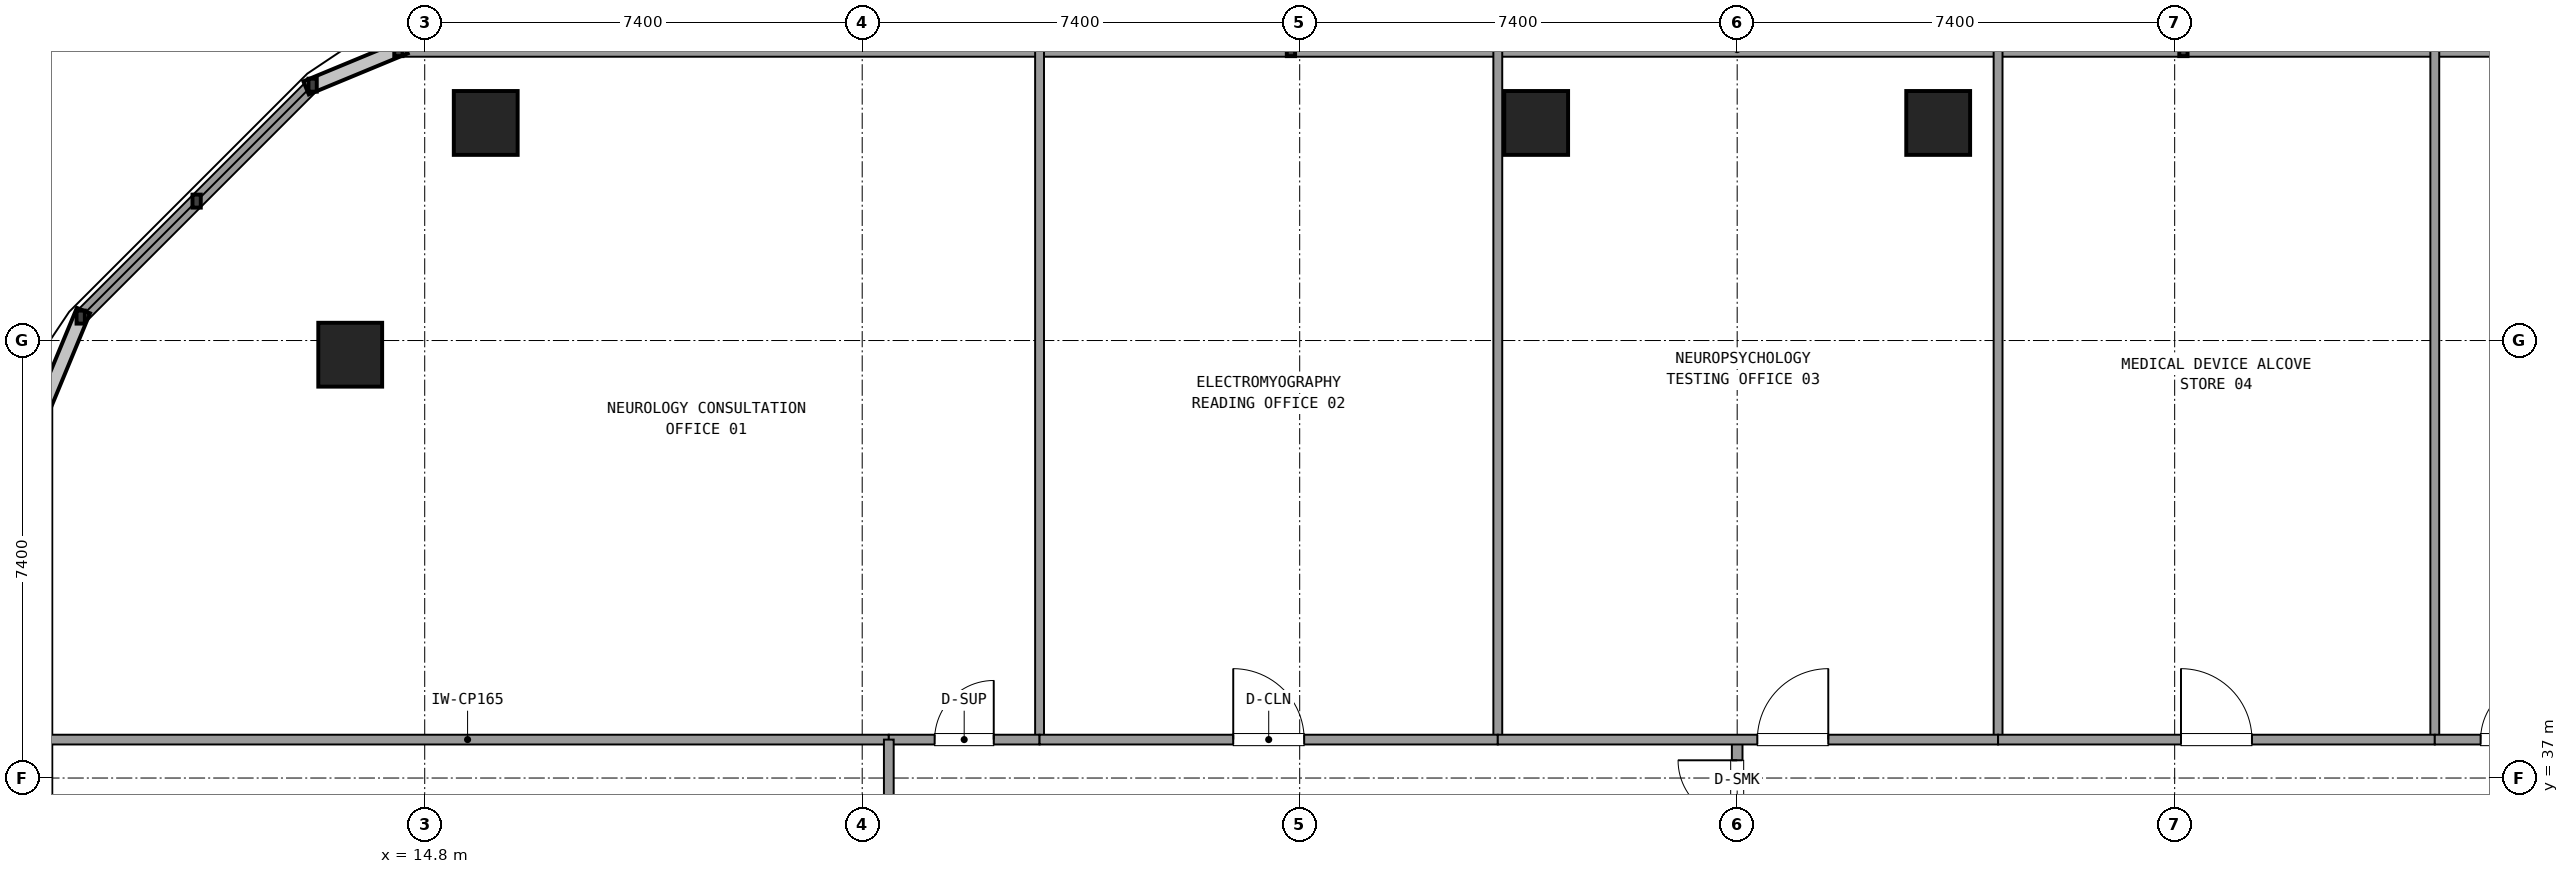
"""IFC4 building model, lengths in metres.
Left out: names, types, materials, properties, quantities, classifications, styles, units other than length and angle.
Written with IfcOpenShell. Run it as: python <this file> out.ifc"""

import sys

from ifc_helpers import new_model, si_unit, direction, frame, frame_2d, origin, origin_2d, place, context, subcontext, project, spatial, rectangle, extrude, element, fill, save


model = new_model("IFC4")
c1 = context("Model", 3, precision=1e-05, world=origin(), true_north=direction((0.0, 1.0)))
c2 = subcontext(c1, "Body", "Model", "MODEL_VIEW")
j1 = project(units=[si_unit("LENGTHUNIT", "METRE"), si_unit("PLANEANGLEUNIT", "RADIAN")], contexts=[c1])
p1 = place(None, origin())
s1 = spatial("IfcSite", under=j1, at=p1, CompositionType="ELEMENT")
p2 = place(p1, origin())
s2 = spatial("IfcBuilding", under=s1, at=p2, CompositionType="ELEMENT")
p3 = place(p2, frame((0.0, 0.0, 63.54)))
s3 = spatial("IfcBuildingStorey", under=s2, at=p3, CompositionType="ELEMENT", Elevation=63.54)
for number, where, z_axis, x_axis in (
    (1, (40.4, 48.08, 0.0), (0.0, 0.0, 1.0), (1.0, 0.0, 0.0)),
    (2, (33.6, 48.08, 0.0), (0.0, 0.0, 1.0), (1.0, 0.0, 0.0)),
    (3, (15.832, 48.08, 0.0), (0.0, 0.0, 1.0), (1.0, 0.0, 0.0)),
    (4, (13.54, 44.16, 0.0), (0.0, 0.0, 1.0), (1.0, 0.0, 0.0)),
):
    element("IfcColumn", number, at=place(p3, frame(where, z_axis=z_axis, x_axis=x_axis)), inside=s3, PredefinedType="COLUMN", context=c2, shape_type="SweptSolid", body=[
        extrude(rectangle(XDim=1.08, YDim=1.08, at=origin_2d()), origin(), (0.0, 0.0, 1.0), 3.6),
    ])
p4 = place(p3, frame((59.645, 49.32, 0.0), z_axis=(0.0, 0.0, 1.0), x_axis=(-1.0, 0.0, 0.0)))
e5 = element("IfcWall", 5, at=p4, inside=s3, PredefinedType="SOLIDWALL", context=c2, shape_type="SweptSolid", body=[
    extrude(rectangle(XDim=45.29, YDim=0.24, at=frame_2d((22.645, 0.0))), origin(), (0.0, 0.0, 1.0), 0.85),
])
p5 = place(p3, frame((12.904, 48.719, 0.0), z_axis=(0.0, 0.0, 1.0), x_axis=(-0.707106781187, -0.707106781187, 0.0)))
e6 = element("IfcWall", 6, at=p5, inside=s3, PredefinedType="SOLIDWALL", context=c2, shape_type="SweptSolid", body=[
    extrude(rectangle(XDim=5.548, YDim=0.24, at=frame_2d((2.774, 0.0))), origin(), (0.0, 0.0, 1.0), 0.85),
])
p6 = place(p3, frame((37.0, 34.95, 0.0), z_axis=(0.0, 0.0, 1.0), x_axis=(0.0, 1.0, 0.0)))
e7 = element("IfcWall", 7, at=p6, inside=s3, PredefinedType="PARTITIONING", context=c2, shape_type="SweptSolid", body=[
    extrude(rectangle(XDim=2.7, YDim=0.18, at=frame_2d((1.35, 0.0))), origin(), (0.0, 0.0, 1.0), 2.61),
])
p7 = place(p6, frame((0.35, 0.0, 0.0)))
e8 = element("IfcOpeningElement", 8, at=p7, cuts=e7, PredefinedType="OPENING", context=c2, shape_type="SweptSolid", body=[
    extrude(rectangle(XDim=2.0, YDim=2.2, at=frame_2d((1.0, 1.1))), frame((0.0, 0.1, 0.0), z_axis=(0.0, -1.0, 0.0), x_axis=(1.0, 0.0, 0.0)), (0.0, 0.0, 1.0), 0.2),
])
p8 = place(p3, frame((8.4, 37.65, 0.0), z_axis=(0.0, 0.0, 1.0), x_axis=(1.0, 0.0, 0.0)))
e9 = element("IfcWall", 9, at=p8, inside=s3, PredefinedType="PARTITIONING", context=c2, shape_type="SweptSolid", body=[
    extrude(rectangle(XDim=14.25, YDim=0.165, at=frame_2d((7.125, 0.0))), origin(), (0.0, 0.0, 1.0), 2.61),
])
p9 = place(p3, frame((25.2, 37.65, 0.0), z_axis=(0.0, 0.0, 1.0), x_axis=(0.0, 1.0, 0.0)))
e10 = element("IfcWall", 10, at=p9, inside=s3, PredefinedType="PARTITIONING", context=c2, shape_type="SweptSolid", body=[
    extrude(rectangle(XDim=11.65, YDim=0.15, at=frame_2d((5.825, 0.0))), origin(), (0.0, 0.0, 1.0), 2.61),
])
p10 = place(p3, frame((22.65, 37.65, 0.0), z_axis=(0.0, 0.0, 1.0), x_axis=(1.0, 0.0, 0.0)))
e11 = element("IfcWall", 11, at=p10, inside=s3, PredefinedType="PARTITIONING", context=c2, shape_type="SweptSolid", body=[
    extrude(rectangle(XDim=2.55, YDim=0.165, at=frame_2d((1.275, 0.0))), origin(), (0.0, 0.0, 1.0), 2.61),
])
p11 = place(p10, frame((0.775, 0.0, 0.0)))
e12 = element("IfcOpeningElement", 12, at=p11, cuts=e11, PredefinedType="OPENING", context=c2, shape_type="SweptSolid", body=[
    extrude(rectangle(XDim=1.0, YDim=2.15, at=frame_2d((0.5, 1.075))), frame((0.0, 0.093, 0.0), z_axis=(0.0, -1.0, 0.0), x_axis=(1.0, 0.0, 0.0)), (0.0, 0.0, 1.0), 0.185),
])
p12 = place(p3, frame((32.951, 37.65, 0.0), z_axis=(0.0, 0.0, 1.0), x_axis=(0.0, 1.0, 0.0)))
e13 = element("IfcWall", 13, at=p12, inside=s3, PredefinedType="PARTITIONING", context=c2, shape_type="SweptSolid", body=[
    extrude(rectangle(XDim=11.65, YDim=0.15, at=frame_2d((5.825, 0.0))), origin(), (0.0, 0.0, 1.0), 2.61),
])
p13 = place(p3, frame((25.2, 37.65, 0.0), z_axis=(0.0, 0.0, 1.0), x_axis=(1.0, 0.0, 0.0)))
e14 = element("IfcWall", 14, at=p13, inside=s3, PredefinedType="PARTITIONING", context=c2, shape_type="SweptSolid", body=[
    extrude(rectangle(XDim=7.751, YDim=0.165, at=frame_2d((3.875, 0.0))), origin(), (0.0, 0.0, 1.0), 2.61),
])
p14 = place(p13, frame((3.276, 0.0, 0.0)))
e15 = element("IfcOpeningElement", 15, at=p14, cuts=e14, PredefinedType="OPENING", context=c2, shape_type="SweptSolid", body=[
    extrude(rectangle(XDim=1.2, YDim=2.15, at=frame_2d((0.6, 1.075))), frame((0.0, 0.093, 0.0), z_axis=(0.0, -1.0, 0.0), x_axis=(1.0, 0.0, 0.0)), (0.0, 0.0, 1.0), 0.185),
])
p15 = place(p3, frame((41.413, 37.65, 0.0), z_axis=(0.0, 0.0, 1.0), x_axis=(0.0, 1.0, 0.0)))
e16 = element("IfcWall", 16, at=p15, inside=s3, PredefinedType="PARTITIONING", context=c2, shape_type="SweptSolid", body=[
    extrude(rectangle(XDim=11.65, YDim=0.15, at=frame_2d((5.825, 0.0))), origin(), (0.0, 0.0, 1.0), 2.61),
])
p16 = place(p3, frame((32.951, 37.65, 0.0), z_axis=(0.0, 0.0, 1.0), x_axis=(1.0, 0.0, 0.0)))
e17 = element("IfcWall", 17, at=p16, inside=s3, PredefinedType="PARTITIONING", context=c2, shape_type="SweptSolid", body=[
    extrude(rectangle(XDim=8.462, YDim=0.165, at=frame_2d((4.231, 0.0))), origin(), (0.0, 0.0, 1.0), 2.61),
])
p17 = place(p16, frame((4.39, 0.0, 0.0)))
e18 = element("IfcOpeningElement", 18, at=p17, cuts=e17, PredefinedType="OPENING", context=c2, shape_type="SweptSolid", body=[
    extrude(rectangle(XDim=1.2, YDim=2.15, at=frame_2d((0.6, 1.075))), frame((0.0, 0.093, 0.0), z_axis=(0.0, -1.0, 0.0), x_axis=(1.0, 0.0, 0.0)), (0.0, 0.0, 1.0), 0.185),
])
p18 = place(p3, frame((48.8, 37.65, 0.0), z_axis=(0.0, 0.0, 1.0), x_axis=(0.0, 1.0, 0.0)))
e19 = element("IfcWall", 19, at=p18, inside=s3, PredefinedType="PARTITIONING", context=c2, shape_type="SweptSolid", body=[
    extrude(rectangle(XDim=11.65, YDim=0.15, at=frame_2d((5.825, 0.0))), origin(), (0.0, 0.0, 1.0), 2.61),
])
p19 = place(p3, frame((41.413, 37.65, 0.0), z_axis=(0.0, 0.0, 1.0), x_axis=(1.0, 0.0, 0.0)))
e20 = element("IfcWall", 20, at=p19, inside=s3, PredefinedType="PARTITIONING", context=c2, shape_type="SweptSolid", body=[
    extrude(rectangle(XDim=7.387, YDim=0.165, at=frame_2d((3.693, 0.0))), origin(), (0.0, 0.0, 1.0), 2.61),
])
p20 = place(p19, frame((3.094, 0.0, 0.0)))
e21 = element("IfcOpeningElement", 21, at=p20, cuts=e20, PredefinedType="OPENING", context=c2, shape_type="SweptSolid", body=[
    extrude(rectangle(XDim=1.2, YDim=2.15, at=frame_2d((0.6, 1.075))), frame((0.0, 0.093, 0.0), z_axis=(0.0, -1.0, 0.0), x_axis=(1.0, 0.0, 0.0)), (0.0, 0.0, 1.0), 0.185),
])
p21 = place(p3, frame((48.8, 37.65, 0.0), z_axis=(0.0, 0.0, 1.0), x_axis=(1.0, 0.0, 0.0)))
e22 = element("IfcWall", 22, at=p21, inside=s3, PredefinedType="PARTITIONING", context=c2, shape_type="SweptSolid", body=[
    extrude(rectangle(XDim=2.55, YDim=0.165, at=frame_2d((1.275, 0.0))), origin(), (0.0, 0.0, 1.0), 2.61),
])
p22 = place(p21, frame((0.775, 0.0, 0.0)))
e23 = element("IfcOpeningElement", 23, at=p22, cuts=e22, PredefinedType="OPENING", context=c2, shape_type="SweptSolid", body=[
    extrude(rectangle(XDim=1.0, YDim=2.15, at=frame_2d((0.5, 1.075))), frame((0.0, 0.093, 0.0), z_axis=(0.0, -1.0, 0.0), x_axis=(1.0, 0.0, 0.0)), (0.0, 0.0, 1.0), 0.185),
])
p23 = place(p3, frame((22.65, 30.365, 0.0), z_axis=(0.0, 0.0, 1.0), x_axis=(0.0, 1.0, 0.0)))
e24 = element("IfcWall", 24, at=p23, inside=s3, PredefinedType="PARTITIONING", context=c2, shape_type="SweptSolid", body=[
    extrude(rectangle(XDim=7.285, YDim=0.165, at=frame_2d((3.643, 0.0))), origin(), (0.0, 0.0, 1.0), 2.61),
])
p24 = place(p23, frame((3.042, 0.0, 0.0)))
e25 = element("IfcOpeningElement", 25, at=p24, cuts=e24, PredefinedType="OPENING", context=c2, shape_type="SweptSolid", body=[
    extrude(rectangle(XDim=1.2, YDim=2.15, at=frame_2d((0.6, 1.075))), frame((0.0, 0.093, 0.0), z_axis=(0.0, -1.0, 0.0), x_axis=(1.0, 0.0, 0.0)), (0.0, 0.0, 1.0), 0.185),
])
p25 = place(p7, origin())
e26 = element("IfcDoor", 26, at=p25, inside=s3, OperationType="DOUBLE_DOOR_SINGLE_SWING", PredefinedType="DOOR", context=c2, shape_type="SweptSolid", body=[
    extrude(rectangle(XDim=2.0, YDim=2.2, at=frame_2d((1.0, 1.1))), frame((0.0, 0.025, 0.0), z_axis=(0.0, -1.0, 0.0), x_axis=(1.0, 0.0, 0.0)), (0.0, 0.0, 1.0), 0.05),
])
fill(e8, e26)
p26 = place(p11, origin())
e27 = element("IfcDoor", 27, at=p26, inside=s3, OperationType="SINGLE_SWING_RIGHT", PredefinedType="DOOR", context=c2, shape_type="SweptSolid", body=[
    extrude(rectangle(XDim=1.0, YDim=2.15, at=frame_2d((0.5, 1.075))), frame((0.0, 0.025, 0.0), z_axis=(0.0, -1.0, 0.0), x_axis=(1.0, 0.0, 0.0)), (0.0, 0.0, 1.0), 0.05),
])
fill(e12, e27)
p27 = place(p14, origin())
e28 = element("IfcDoor", 28, at=p27, inside=s3, OperationType="SINGLE_SWING_LEFT", PredefinedType="DOOR", context=c2, shape_type="SweptSolid", body=[
    extrude(rectangle(XDim=1.2, YDim=2.15, at=frame_2d((0.6, 1.075))), frame((0.0, 0.025, 0.0), z_axis=(0.0, -1.0, 0.0), x_axis=(1.0, 0.0, 0.0)), (0.0, 0.0, 1.0), 0.05),
])
fill(e15, e28)
p28 = place(p17, origin())
e29 = element("IfcDoor", 29, at=p28, inside=s3, OperationType="SINGLE_SWING_RIGHT", PredefinedType="DOOR", context=c2, shape_type="SweptSolid", body=[
    extrude(rectangle(XDim=1.2, YDim=2.15, at=frame_2d((0.6, 1.075))), frame((0.0, 0.025, 0.0), z_axis=(0.0, -1.0, 0.0), x_axis=(1.0, 0.0, 0.0)), (0.0, 0.0, 1.0), 0.05),
])
fill(e18, e29)
p29 = place(p20, origin())
e30 = element("IfcDoor", 30, at=p29, inside=s3, OperationType="SINGLE_SWING_LEFT", PredefinedType="DOOR", context=c2, shape_type="SweptSolid", body=[
    extrude(rectangle(XDim=1.2, YDim=2.15, at=frame_2d((0.6, 1.075))), frame((0.0, 0.025, 0.0), z_axis=(0.0, -1.0, 0.0), x_axis=(1.0, 0.0, 0.0)), (0.0, 0.0, 1.0), 0.05),
])
fill(e21, e30)
p30 = place(p22, origin())
e31 = element("IfcDoor", 31, at=p30, inside=s3, OperationType="SINGLE_SWING_RIGHT", PredefinedType="DOOR", context=c2, shape_type="SweptSolid", body=[
    extrude(rectangle(XDim=1.0, YDim=2.15, at=frame_2d((0.5, 1.075))), frame((0.0, 0.025, 0.0), z_axis=(0.0, -1.0, 0.0), x_axis=(1.0, 0.0, 0.0)), (0.0, 0.0, 1.0), 0.05),
])
fill(e23, e31)
save(model, sys.argv[1])
